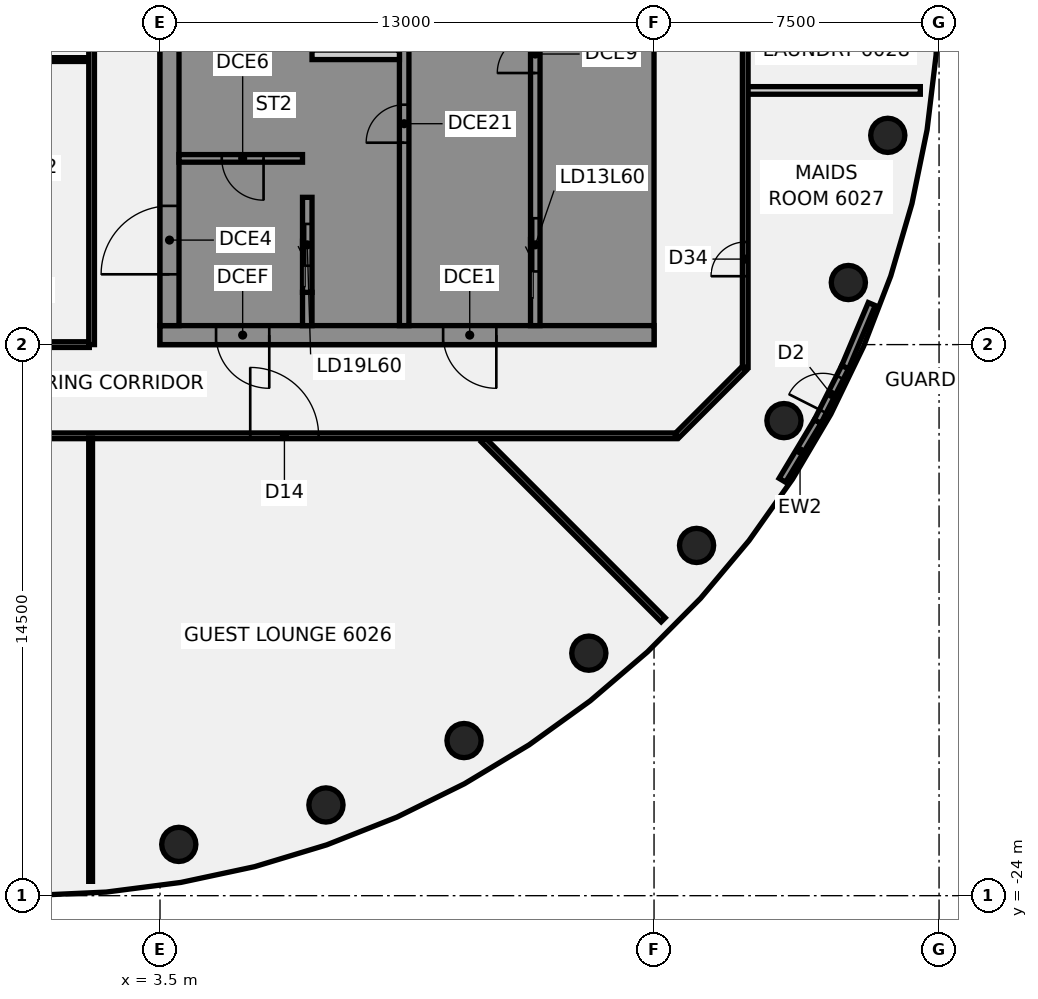
"""IFC4 building model, lengths in metres.
Left out: names, types, materials, properties, quantities, classifications, styles, units other than length and angle.
Written with IfcOpenShell. Run it as: python <this file> out.ifc"""

import sys

from ifc_helpers import new_model, si_unit, direction, frame, frame_2d, origin, origin_2d, place, context, subcontext, project, spatial, polyline, rectangle, circle, outline, extrude, element, fill, save


model = new_model("IFC4")
c1 = context("Model", 3, precision=1e-05, world=origin(), true_north=direction((0.0, 1.0)))
c2 = subcontext(c1, "Body", "Model", "MODEL_VIEW")
j1 = project(units=[si_unit("LENGTHUNIT", "METRE"), si_unit("PLANEANGLEUNIT", "RADIAN")], contexts=[c1])
p1 = place(None, origin())
s1 = spatial("IfcSite", under=j1, at=p1, CompositionType="ELEMENT")
p2 = place(p1, origin())
s2 = spatial("IfcBuilding", under=s1, at=p2, CompositionType="ELEMENT")
p3 = place(p2, frame((0.0, 0.0, 237.9)))
s3 = spatial("IfcBuildingStorey", under=s2, at=p3, CompositionType="ELEMENT", Elevation=237.9)
for number, where, z_axis, x_axis in (
    (1, (3.994, -22.651, -0.14), (0.0, 0.0, 1.0), (1.0, 0.0, 0.0)),
    (2, (7.866, -21.613, -0.14), (0.0, 0.0, 1.0), (1.0, 0.0, 0.0)),
    (3, (11.5, -19.919, -0.14), (0.0, 0.0, 1.0), (1.0, 0.0, 0.0)),
    (4, (14.784, -17.619, -0.14), (0.0, 0.0, 1.0), (1.0, 0.0, 0.0)),
    (5, (17.619, -14.784, -0.14), (0.0, 0.0, 1.0), (1.0, 0.0, 0.0)),
    (6, (19.919, -11.5, -0.14), (0.0, 0.0, 1.0), (1.0, 0.0, 0.0)),
    (7, (21.613, -7.866, -0.14), (0.0, 0.0, 1.0), (1.0, 0.0, 0.0)),
    (8, (22.651, -3.994, -0.14), (0.0, 0.0, 1.0), (1.0, 0.0, 0.0)),
):
    element("IfcColumn", number, at=place(p3, frame(where, z_axis=z_axis, x_axis=x_axis)), inside=s3, PredefinedType="COLUMN", context=c2, shape_type="SweptSolid", body=[
        extrude(circle(Radius=0.45, at=origin_2d()), origin(), (0.0, 0.0, 1.0), 3.6),
    ])
p4 = place(p3, frame((12.01, -12.01, 0.0), z_axis=(0.0, 0.0, 1.0), x_axis=(0.707106781187, -0.707106781187, 0.0)))
e9 = element("IfcWall", 9, at=p4, inside=s3, PredefinedType="PARTITIONING", context=c2, shape_type="SweptSolid", body=[
    extrude(rectangle(XDim=6.691, YDim=0.15, at=frame_2d((3.345, 0.0))), origin(), (0.0, 0.0, 1.0), 2.864),
])
p5 = place(p3, frame((-17.1, -11.9, 0.0), z_axis=(0.0, 0.0, 1.0), x_axis=(1.0, 0.0, 0.0)))
e10 = element("IfcWall", 10, at=p5, inside=s3, PredefinedType="PARTITIONING", context=c2, shape_type="SweptSolid", body=[
    extrude(rectangle(XDim=34.165, YDim=0.15, at=frame_2d((17.083, 0.0))), origin(), (0.0, 0.0, 1.0), 2.864),
])
p6 = place(p5, frame((6.4, 0.0, 0.0)))
e11 = element("IfcOpeningElement", 11, at=p6, cuts=e10, PredefinedType="OPENING", context=c2, shape_type="SweptSolid", body=[
    extrude(rectangle(XDim=1.8, YDim=2.1, at=frame_2d((0.9, 1.05))), frame((0.0, 0.085, 0.0), z_axis=(0.0, -1.0, 0.0), x_axis=(1.0, 0.0, 0.0)), (0.0, 0.0, 1.0), 0.17),
])
p7 = place(p5, frame((12.909, 0.0, 0.0)))
e12 = element("IfcOpeningElement", 12, at=p7, cuts=e10, PredefinedType="OPENING", context=c2, shape_type="SweptSolid", body=[
    extrude(rectangle(XDim=1.8, YDim=2.1, at=frame_2d((0.9, 1.05))), frame((0.0, 0.085, 0.0), z_axis=(0.0, -1.0, 0.0), x_axis=(1.0, 0.0, 0.0)), (0.0, 0.0, 1.0), 0.17),
])
p8 = place(p5, frame((22.974, 0.0, 0.0)))
e13 = element("IfcOpeningElement", 13, at=p8, cuts=e10, PredefinedType="OPENING", context=c2, shape_type="SweptSolid", body=[
    extrude(rectangle(XDim=1.8, YDim=2.1, at=frame_2d((0.9, 1.05))), frame((0.0, 0.085, 0.0), z_axis=(0.0, -1.0, 0.0), x_axis=(1.0, 0.0, 0.0)), (0.0, 0.0, 1.0), 0.17),
])
p9 = place(p5, frame((1.65, 0.0, 0.0)))
e14 = element("IfcOpeningElement", 14, at=p9, cuts=e10, PredefinedType="OPENING", context=c2, shape_type="SweptSolid", body=[
    extrude(rectangle(XDim=0.9, YDim=2.1, at=frame_2d((0.45, 1.05))), frame((0.0, 0.085, 0.0), z_axis=(0.0, -1.0, 0.0), x_axis=(1.0, 0.0, 0.0)), (0.0, 0.0, 1.0), 0.17),
])
p10 = place(p3, frame((-1.64, -9.5, 0.0), z_axis=(0.0, 0.0, 1.0), x_axis=(1.0, 0.0, 0.0)))
e15 = element("IfcWall", 15, at=p10, inside=s3, PredefinedType="PARTITIONING", context=c2, shape_type="SweptSolid", body=[
    extrude(rectangle(XDim=3.28, YDim=0.15, at=frame_2d((1.64, 0.0))), origin(), (0.0, 0.0, 1.0), 2.864),
])
p11 = place(p3, frame((-1.64, -2.0, 0.0), z_axis=(0.0, 0.0, 1.0), x_axis=(1.0, 0.0, 0.0)))
e16 = element("IfcWall", 16, at=p11, inside=s3, PredefinedType="PARTITIONING", context=c2, shape_type="SweptSolid", body=[
    extrude(rectangle(XDim=3.28, YDim=0.1, at=frame_2d((1.64, 0.0))), origin(), (0.0, 0.0, 1.0), 2.864),
])
p12 = place(p3, frame((18.955, -2.812, 0.0), z_axis=(0.0, 0.0, 1.0), x_axis=(1.0, 0.0, 0.0)))
e17 = element("IfcWall", 17, at=p12, inside=s3, PredefinedType="PARTITIONING", context=c2, shape_type="SweptSolid", body=[
    extrude(rectangle(XDim=4.552, YDim=0.2, at=frame_2d((2.276, 0.0))), origin(), (0.0, 0.0, 1.0), 2.864),
])
p13 = place(p3, frame((17.1, -11.9, 0.0), z_axis=(0.0, 0.0, 1.0), x_axis=(0.707106781187, 0.707106781187, 0.0)))
e18 = element("IfcWall", 18, at=p13, inside=s3, PredefinedType="PARTITIONING", context=c2, shape_type="SweptSolid", body=[
    extrude(rectangle(XDim=2.505, YDim=0.15, at=frame_2d((1.253, 0.0))), origin(), (0.0, 0.0, 1.0), 2.864),
])
p14 = place(p3, frame((1.674, -23.623, 0.0), z_axis=(0.0, 0.0, 1.0), x_axis=(0.0, 1.0, 0.0)))
e19 = element("IfcWall", 19, at=p14, inside=s3, PredefinedType="PARTITIONING", context=c2, shape_type="SweptSolid", body=[
    extrude(rectangle(XDim=11.668, YDim=0.1, at=frame_2d((5.834, 0.0))), origin(), (0.0, 0.0, 1.0), 2.864),
])
p15 = place(p3, frame((1.7, -9.5, 0.0), z_axis=(0.0, 0.0, 1.0), x_axis=(0.0, 1.0, 0.0)))
e20 = element("IfcWall", 20, at=p15, inside=s3, PredefinedType="PARTITIONING", context=c2, shape_type="SweptSolid", body=[
    extrude(rectangle(XDim=19.0, YDim=0.15, at=frame_2d((9.5, 0.0))), origin(), (0.0, 0.0, 1.0), 2.864),
])
p16 = place(p3, frame((18.9, -10.1, 0.0), z_axis=(0.0, 0.0, 1.0), x_axis=(0.0, 1.0, 0.0)))
e21 = element("IfcWall", 21, at=p16, inside=s3, PredefinedType="PARTITIONING", context=c2, shape_type="SweptSolid", body=[
    extrude(rectangle(XDim=20.2, YDim=0.15, at=frame_2d((10.1, 0.0))), origin(), (0.0, 0.0, 1.0), 2.864),
])
p17 = place(p16, frame((2.4, 0.0, 0.0)))
e22 = element("IfcOpeningElement", 22, at=p17, cuts=e21, PredefinedType="OPENING", context=c2, shape_type="SweptSolid", body=[
    extrude(rectangle(XDim=0.9, YDim=2.1, at=frame_2d((0.45, 1.05))), frame((0.0, 0.085, 0.0), z_axis=(0.0, -1.0, 0.0), x_axis=(1.0, 0.0, 0.0)), (0.0, 0.0, 1.0), 0.17),
])
p18 = place(p16, frame((11.038, 0.0, 0.0)))
e23 = element("IfcOpeningElement", 23, at=p18, cuts=e21, PredefinedType="OPENING", context=c2, shape_type="SweptSolid", body=[
    extrude(rectangle(XDim=0.9, YDim=2.1, at=frame_2d((0.45, 1.05))), frame((0.0, 0.085, 0.0), z_axis=(0.0, -1.0, 0.0), x_axis=(1.0, 0.0, 0.0)), (0.0, 0.0, 1.0), 0.17),
])
p19 = place(p3, frame((19.877, -13.07, 0.0), z_axis=(0.0, 0.0, 1.0), x_axis=(0.515012774923, 0.85718250196, 0.0)))
e24 = element("IfcWall", 24, at=p19, inside=s3, PredefinedType="SOLIDWALL", context=c2, shape_type="SweptSolid", body=[
    extrude(rectangle(XDim=1.805, YDim=0.2, at=frame_2d((0.903, 0.0))), origin(), (0.0, 0.0, 1.0), 3.46),
])
p20 = place(p3, frame((21.528, -10.095, 0.0), z_axis=(0.0, 0.0, 1.0), x_axis=(0.389260368578, 0.921127768257, 0.0)))
e25 = element("IfcWall", 25, at=p20, inside=s3, PredefinedType="SOLIDWALL", context=c2, shape_type="SweptSolid", body=[
    extrude(rectangle(XDim=1.804, YDim=0.2, at=frame_2d((0.902, 0.0))), origin(), (0.0, 0.0, 1.0), 3.46),
])
p21 = place(p3, frame((20.807, -11.523, 0.0), z_axis=(0.0, 0.0, 1.0), x_axis=(0.450691156641, 0.892679943387, 0.0)))
e26 = element("IfcWall", 26, at=p21, inside=s3, PredefinedType="SOLIDWALL", context=c2, shape_type="SweptSolid", body=[
    extrude(rectangle(XDim=1.599, YDim=0.2, at=frame_2d((0.8, 0.0))), origin(), (0.0, 0.0, 1.0), 3.46),
])
p22 = place(p21, frame((0.3, 0.0, 0.0)))
e27 = element("IfcOpeningElement", 27, at=p22, cuts=e26, PredefinedType="OPENING", context=c2, shape_type="SweptSolid", body=[
    extrude(rectangle(XDim=1.0, YDim=2.4, at=frame_2d((0.5, 1.2))), frame((0.0, 0.11, 0.0), z_axis=(0.0, -1.0, 0.0), x_axis=(1.0, 0.0, 0.0)), (0.0, 0.0, 1.0), 0.22),
])
p23 = place(p3, frame((16.5, -9.25, 0.0), z_axis=(0.0, 0.0, 1.0), x_axis=(-1.0, 0.0, 0.0)))
e28 = element("IfcWall", 28, at=p23, inside=s3, PredefinedType="SHEAR", context=c2, shape_type="SweptSolid", body=[
    extrude(rectangle(XDim=13.0, YDim=0.5, at=frame_2d((6.5, 0.0))), origin(), (0.0, 0.0, 1.0), 3.46),
])
p24 = place(p23, frame((4.15, 0.0, 0.0)))
e29 = element("IfcOpeningElement", 29, at=p24, cuts=e28, PredefinedType="OPENING", context=c2, shape_type="SweptSolid", body=[
    extrude(rectangle(XDim=1.4, YDim=2.1, at=frame_2d((0.7, 1.05))), frame((0.0, 0.26, 0.0), z_axis=(0.0, -1.0, 0.0), x_axis=(1.0, 0.0, 0.0)), (0.0, 0.0, 1.0), 0.52),
])
p25 = place(p23, frame((10.125, 0.0, 0.0)))
e30 = element("IfcOpeningElement", 30, at=p25, cuts=e28, PredefinedType="OPENING", context=c2, shape_type="SweptSolid", body=[
    extrude(rectangle(XDim=1.4, YDim=2.1, at=frame_2d((0.7, 1.05))), frame((0.0, 0.26, 0.0), z_axis=(0.0, -1.0, 0.0), x_axis=(1.0, 0.0, 0.0)), (0.0, 0.0, 1.0), 0.52),
])
p26 = place(p3, origin())
e31 = element("IfcWall", 31, at=p26, inside=s3, PredefinedType="SHEAR", context=c2, shape_type="SweptSolid", body=[
    extrude(outline(polyline([(13.5, -8.125), (13.5, -9.0), (16.0, -9.0), (16.5, -9.0), (16.5, 9.0), (16.0, 9.0), (13.5, 9.0), (13.5, 8.125), (16.0, 8.125), (16.0, 5.625), (13.5, 5.625), (13.5, 5.375), (16.0, 5.375), (16.0, -5.375), (13.5, -5.375), (13.5, -5.625), (16.0, -5.625), (16.0, -8.125), (13.5, -8.125)])), origin(), (0.0, 0.0, 1.0), 3.46),
])
p27 = place(p3, origin())
e32 = element("IfcWall", 32, at=p27, inside=s3, PredefinedType="SHEAR", context=c2, shape_type="SweptSolid", body=[
    extrude(outline(polyline([(9.8, -5.375), (7.5, -5.375), (7.5, 2.625), (9.8, 2.625), (9.8, 2.875), (7.5, 2.875), (7.5, 5.375), (9.8, 5.375), (9.8, 5.625), (7.5, 5.625), (7.5, 8.125), (9.8, 8.125), (9.8, 9.0), (7.5, 9.0), (7.25, 9.0), (7.25, -5.625), (7.5, -5.625), (9.8, -5.625), (9.8, -5.375)])), origin(), (0.0, 0.0, 1.0), 3.46),
])
p28 = place(p3, origin())
e33 = element("IfcWall", 33, at=p28, inside=s3, PredefinedType="SHEAR", context=c2, shape_type="SweptSolid", body=[
    extrude(outline(polyline([(7.5, -8.125), (7.5, -9.0), (9.8, -9.0), (9.8, -8.125), (9.8, -5.625), (9.55, -5.625), (9.55, -8.125), (7.5, -8.125)])), origin(), (0.0, 0.0, 1.0), 3.46),
])
p29 = place(p3, frame((7.375, -9.0, 0.0), z_axis=(0.0, 0.0, 1.0), x_axis=(0.0, 1.0, 0.0)))
e34 = element("IfcWall", 34, at=p29, inside=s3, PredefinedType="SHEAR", context=c2, shape_type="SweptSolid", body=[
    extrude(rectangle(XDim=0.875, YDim=0.25, at=frame_2d((0.438, 0.0))), origin(), (0.0, 0.0, 1.0), 3.46),
])
p30 = place(p3, frame((13.375, -9.0, 0.0), z_axis=(0.0, 0.0, 1.0), x_axis=(0.0, 1.0, 0.0)))
e35 = element("IfcWall", 35, at=p30, inside=s3, PredefinedType="SHEAR", context=c2, shape_type="SweptSolid", body=[
    extrude(rectangle(XDim=18.0, YDim=0.25, at=frame_2d((9.0, 0.0))), origin(), (0.0, 0.0, 1.0), 3.46),
])
p31 = place(p30, frame((1.425, 0.0, 0.0)))
e36 = element("IfcOpeningElement", 36, at=p31, cuts=e35, PredefinedType="OPENING", context=c2, shape_type="SweptSolid", body=[
    extrude(rectangle(XDim=1.4, YDim=2.1, at=frame_2d((0.7, 1.05))), frame((0.0, 0.135, 0.0), z_axis=(0.0, -1.0, 0.0), x_axis=(1.0, 0.0, 0.0)), (0.0, 0.0, 1.0), 0.27),
])
p32 = place(p30, frame((6.646, 0.0, 0.0)))
e37 = element("IfcOpeningElement", 37, at=p32, cuts=e35, PredefinedType="OPENING", context=c2, shape_type="SweptSolid", body=[
    extrude(rectangle(XDim=1.0, YDim=2.1, at=frame_2d((0.5, 1.05))), frame((0.0, 0.135, 0.0), z_axis=(0.0, -1.0, 0.0), x_axis=(1.0, 0.0, 0.0)), (0.0, 0.0, 1.0), 0.27),
])
p33 = place(p30, frame((12.146, 0.0, 0.0)))
e38 = element("IfcOpeningElement", 38, at=p33, cuts=e35, PredefinedType="OPENING", context=c2, shape_type="SweptSolid", body=[
    extrude(rectangle(XDim=1.0, YDim=2.1, at=frame_2d((0.5, 1.05))), frame((0.0, 0.135, 0.0), z_axis=(0.0, -1.0, 0.0), x_axis=(1.0, 0.0, 0.0)), (0.0, 0.0, 1.0), 0.27),
])
p34 = place(p3, frame((9.925, -9.0, 0.0), z_axis=(0.0, 0.0, 1.0), x_axis=(0.0, 1.0, 0.0)))
e39 = element("IfcWall", 39, at=p34, inside=s3, PredefinedType="SHEAR", context=c2, shape_type="SweptSolid", body=[
    extrude(rectangle(XDim=18.0, YDim=0.25, at=frame_2d((9.0, 0.0))), origin(), (0.0, 0.0, 1.0), 3.46),
])
p35 = place(p34, frame((12.575, 0.0, 0.0)))
e40 = element("IfcOpeningElement", 40, at=p35, cuts=e39, PredefinedType="OPENING", context=c2, shape_type="SweptSolid", body=[
    extrude(rectangle(XDim=1.1, YDim=2.1, at=frame_2d((0.55, 1.05))), frame((0.0, 0.135, 0.0), z_axis=(0.0, -1.0, 0.0), x_axis=(1.0, 0.0, 0.0)), (0.0, 0.0, 1.0), 0.27),
])
p36 = place(p34, frame((15.325, 0.0, 0.0)))
e41 = element("IfcOpeningElement", 41, at=p36, cuts=e39, PredefinedType="OPENING", context=c2, shape_type="SweptSolid", body=[
    extrude(rectangle(XDim=1.1, YDim=2.1, at=frame_2d((0.55, 1.05))), frame((0.0, 0.135, 0.0), z_axis=(0.0, -1.0, 0.0), x_axis=(1.0, 0.0, 0.0)), (0.0, 0.0, 1.0), 0.27),
])
p37 = place(p34, frame((4.812, 0.0, 0.0)))
e42 = element("IfcOpeningElement", 42, at=p37, cuts=e39, PredefinedType="OPENING", context=c2, shape_type="SweptSolid", body=[
    extrude(rectangle(XDim=1.0, YDim=2.1, at=frame_2d((0.5, 1.05))), frame((0.0, 0.135, 0.0), z_axis=(0.0, -1.0, 0.0), x_axis=(1.0, 0.0, 0.0)), (0.0, 0.0, 1.0), 0.27),
])
p38 = place(p34, frame((7.562, 0.0, 0.0)))
e43 = element("IfcOpeningElement", 43, at=p38, cuts=e39, PredefinedType="OPENING", context=c2, shape_type="SweptSolid", body=[
    extrude(rectangle(XDim=1.0, YDim=2.1, at=frame_2d((0.5, 1.05))), frame((0.0, 0.135, 0.0), z_axis=(0.0, -1.0, 0.0), x_axis=(1.0, 0.0, 0.0)), (0.0, 0.0, 1.0), 0.27),
])
p39 = place(p34, frame((9.396, 0.0, 0.0)))
e44 = element("IfcOpeningElement", 44, at=p39, cuts=e39, PredefinedType="OPENING", context=c2, shape_type="SweptSolid", body=[
    extrude(rectangle(XDim=1.0, YDim=2.1, at=frame_2d((0.5, 1.05))), frame((0.0, 0.135, 0.0), z_axis=(0.0, -1.0, 0.0), x_axis=(1.0, 0.0, 0.0)), (0.0, 0.0, 1.0), 0.27),
])
p40 = place(p34, frame((10.771, 0.0, 0.0)))
e45 = element("IfcOpeningElement", 45, at=p40, cuts=e39, PredefinedType="OPENING", context=c2, shape_type="SweptSolid", body=[
    extrude(rectangle(XDim=1.0, YDim=2.1, at=frame_2d((0.5, 1.05))), frame((0.0, 0.135, 0.0), z_axis=(0.0, -1.0, 0.0), x_axis=(1.0, 0.0, 0.0)), (0.0, 0.0, 1.0), 0.27),
])
p41 = place(p3, frame((7.375, -8.125, 0.0), z_axis=(0.0, 0.0, 1.0), x_axis=(0.0, 1.0, 0.0)))
e46 = element("IfcWall", 46, at=p41, inside=s3, PredefinedType="SHEAR", context=c2, shape_type="SweptSolid", body=[
    extrude(rectangle(XDim=2.5, YDim=0.25, at=frame_2d((1.25, 0.0))), origin(), (0.0, 0.0, 1.0), 3.46),
])
p42 = place(p41, frame((0.7, 0.0, 0.0)))
e47 = element("IfcOpeningElement", 47, at=p42, cuts=e46, PredefinedType="OPENING", context=c2, shape_type="SweptSolid", body=[
    extrude(rectangle(XDim=1.1, YDim=2.1, at=frame_2d((0.55, 1.05))), frame((0.0, 0.135, 0.0), z_axis=(0.0, -1.0, 0.0), x_axis=(1.0, 0.0, 0.0)), (0.0, 0.0, 1.0), 0.27),
])
p43 = place(p3, frame((3.75, -9.0, 0.0), z_axis=(0.0, 0.0, 1.0), x_axis=(0.0, 1.0, 0.0)))
e48 = element("IfcWall", 48, at=p43, inside=s3, PredefinedType="SHEAR", context=c2, shape_type="SweptSolid", body=[
    extrude(rectangle(XDim=18.0, YDim=0.5, at=frame_2d((9.0, 0.0))), origin(), (0.0, 0.0, 1.0), 3.46),
])
p44 = place(p43, frame((1.35, 0.0, 0.0)))
e49 = element("IfcOpeningElement", 49, at=p44, cuts=e48, PredefinedType="OPENING", context=c2, shape_type="SweptSolid", body=[
    extrude(rectangle(XDim=1.8, YDim=2.1, at=frame_2d((0.9, 1.05))), frame((0.0, 0.26, 0.0), z_axis=(0.0, -1.0, 0.0), x_axis=(1.0, 0.0, 0.0)), (0.0, 0.0, 1.0), 0.52),
])
p45 = place(p43, frame((12.75, 0.0, 0.0)))
e50 = element("IfcOpeningElement", 50, at=p45, cuts=e48, PredefinedType="OPENING", context=c2, shape_type="SweptSolid", body=[
    extrude(rectangle(XDim=1.0, YDim=2.1, at=frame_2d((0.5, 1.05))), frame((0.0, 0.26, 0.0), z_axis=(0.0, -1.0, 0.0), x_axis=(1.0, 0.0, 0.0)), (0.0, 0.0, 1.0), 0.52),
])
p46 = place(p43, frame((16.274, 0.0, 0.0)))
e51 = element("IfcOpeningElement", 51, at=p46, cuts=e48, PredefinedType="OPENING", context=c2, shape_type="SweptSolid", body=[
    extrude(rectangle(XDim=1.0, YDim=2.1, at=frame_2d((0.5, 1.05))), frame((0.0, 0.26, 0.0), z_axis=(0.0, -1.0, 0.0), x_axis=(1.0, 0.0, 0.0)), (0.0, 0.0, 1.0), 0.52),
])
p47 = place(p3, frame((7.25, -4.6, 0.0), z_axis=(0.0, 0.0, 1.0), x_axis=(-1.0, 0.0, 0.0)))
e52 = element("IfcWall", 52, at=p47, inside=s3, PredefinedType="SHEAR", context=c2, shape_type="SweptSolid", body=[
    extrude(rectangle(XDim=3.25, YDim=0.2, at=frame_2d((1.625, 0.0))), origin(), (0.0, 0.0, 1.0), 3.46),
])
p48 = place(p47, frame((1.025, 0.0, 0.0)))
e53 = element("IfcOpeningElement", 53, at=p48, cuts=e52, PredefinedType="OPENING", context=c2, shape_type="SweptSolid", body=[
    extrude(rectangle(XDim=1.1, YDim=2.1, at=frame_2d((0.55, 1.05))), frame((0.0, 0.11, 0.0), z_axis=(0.0, -1.0, 0.0), x_axis=(1.0, 0.0, 0.0)), (0.0, 0.0, 1.0), 0.22),
])
p49 = place(p3, frame((9.8, -1.875, 0.0), z_axis=(0.0, 0.0, 1.0), x_axis=(-1.0, 0.0, 0.0)))
e54 = element("IfcWall", 54, at=p49, inside=s3, PredefinedType="PARTITIONING", context=c2, shape_type="SweptSolid", body=[
    extrude(rectangle(XDim=2.3, YDim=0.25, at=frame_2d((1.15, 0.0))), origin(), (0.0, 0.0, 1.0), 3.46),
])
p50 = place(p8, frame((1.8, 0.0, 0.0), z_axis=(0.0, 0.0, 1.0), x_axis=(-1.0, 0.0, 0.0)))
e55 = element("IfcDoor", 55, at=p50, inside=s3, OperationType="DOUBLE_DOOR_SINGLE_SWING", PredefinedType="DOOR", context=c2, shape_type="SweptSolid", body=[
    extrude(rectangle(XDim=1.8, YDim=2.1, at=frame_2d((0.9, 1.05))), frame((0.0, 0.025, 0.0), z_axis=(0.0, -1.0, 0.0), x_axis=(1.0, 0.0, 0.0)), (0.0, 0.0, 1.0), 0.05),
])
fill(e13, e55)
p51 = place(p17, frame((0.9, 0.0, 0.0), z_axis=(0.0, 0.0, 1.0), x_axis=(-1.0, 0.0, 0.0)))
e56 = element("IfcDoor", 56, at=p51, inside=s3, OperationType="SINGLE_SWING_LEFT", PredefinedType="DOOR", context=c2, shape_type="SweptSolid", body=[
    extrude(rectangle(XDim=0.9, YDim=2.1, at=frame_2d((0.45, 1.05))), frame((0.0, 0.025, 0.0), z_axis=(0.0, -1.0, 0.0), x_axis=(1.0, 0.0, 0.0)), (0.0, 0.0, 1.0), 0.05),
])
fill(e22, e56)
p52 = place(p22, origin())
e57 = element("IfcDoor", 57, at=p52, inside=s3, OperationType="SINGLE_SWING_LEFT", PredefinedType="DOOR", context=c2, shape_type="SweptSolid", body=[
    extrude(rectangle(XDim=1.0, YDim=2.4, at=frame_2d((0.5, 1.2))), frame((0.0, 0.025, 0.0), z_axis=(0.0, -1.0, 0.0), x_axis=(1.0, 0.0, 0.0)), (0.0, 0.0, 1.0), 0.05),
])
fill(e27, e57)
p53 = place(p24, origin())
e58 = element("IfcDoor", 58, at=p53, inside=s3, OperationType="SINGLE_SWING_LEFT", PredefinedType="DOOR", context=c2, shape_type="SweptSolid", body=[
    extrude(rectangle(XDim=1.4, YDim=2.1, at=frame_2d((0.7, 1.05))), frame((0.0, 0.025, 0.0), z_axis=(0.0, -1.0, 0.0), x_axis=(1.0, 0.0, 0.0)), (0.0, 0.0, 1.0), 0.05),
])
fill(e29, e58)
p54 = place(p25, origin())
e59 = element("IfcDoor", 59, at=p54, inside=s3, OperationType="SINGLE_SWING_LEFT", PredefinedType="DOOR", context=c2, shape_type="SweptSolid", body=[
    extrude(rectangle(XDim=1.4, YDim=2.1, at=frame_2d((0.7, 1.05))), frame((0.0, 0.025, 0.0), z_axis=(0.0, -1.0, 0.0), x_axis=(1.0, 0.0, 0.0)), (0.0, 0.0, 1.0), 0.05),
])
fill(e30, e59)
p55 = place(p44, origin())
e60 = element("IfcDoor", 60, at=p55, inside=s3, OperationType="SINGLE_SWING_LEFT", PredefinedType="DOOR", context=c2, shape_type="SweptSolid", body=[
    extrude(rectangle(XDim=1.8, YDim=2.1, at=frame_2d((0.9, 1.05))), frame((0.0, 0.025, 0.0), z_axis=(0.0, -1.0, 0.0), x_axis=(1.0, 0.0, 0.0)), (0.0, 0.0, 1.0), 0.05),
])
fill(e49, e60)
p56 = place(p48, origin())
e61 = element("IfcDoor", 61, at=p56, inside=s3, OperationType="SINGLE_SWING_LEFT", PredefinedType="DOOR", context=c2, shape_type="SweptSolid", body=[
    extrude(rectangle(XDim=1.1, YDim=2.1, at=frame_2d((0.55, 1.05))), frame((0.0, 0.025, 0.0), z_axis=(0.0, -1.0, 0.0), x_axis=(1.0, 0.0, 0.0)), (0.0, 0.0, 1.0), 0.05),
])
fill(e53, e61)
p57 = place(p31, origin())
e62 = element("IfcDoor", 62, at=p57, inside=s3, OperationType="SLIDING_TO_LEFT", PredefinedType="DOOR", context=c2, shape_type="SweptSolid", body=[
    extrude(rectangle(XDim=1.4, YDim=2.1, at=frame_2d((0.7, 1.05))), frame((0.0, 0.025, 0.0), z_axis=(0.0, -1.0, 0.0), x_axis=(1.0, 0.0, 0.0)), (0.0, 0.0, 1.0), 0.05),
])
fill(e36, e62)
p58 = place(p42, origin())
e63 = element("IfcDoor", 63, at=p58, inside=s3, OperationType="SLIDING_TO_LEFT", PredefinedType="DOOR", context=c2, shape_type="SweptSolid", body=[
    extrude(rectangle(XDim=1.1, YDim=2.1, at=frame_2d((0.55, 1.05))), frame((0.0, 0.025, 0.0), z_axis=(0.0, -1.0, 0.0), x_axis=(1.0, 0.0, 0.0)), (0.0, 0.0, 1.0), 0.05),
])
fill(e47, e63)
p59 = place(p32, origin())
e64 = element("IfcDoor", 64, at=p59, inside=s3, OperationType="SINGLE_SWING_LEFT", PredefinedType="DOOR", context=c2, shape_type="SweptSolid", body=[
    extrude(rectangle(XDim=1.0, YDim=2.1, at=frame_2d((0.5, 1.05))), frame((0.0, 0.025, 0.0), z_axis=(0.0, -1.0, 0.0), x_axis=(1.0, 0.0, 0.0)), (0.0, 0.0, 1.0), 0.05),
])
fill(e37, e64)
p60 = place(p37, origin())
e65 = element("IfcDoor", 65, at=p60, inside=s3, OperationType="SINGLE_SWING_LEFT", PredefinedType="DOOR", context=c2, shape_type="SweptSolid", body=[
    extrude(rectangle(XDim=1.0, YDim=2.1, at=frame_2d((0.5, 1.05))), frame((0.0, 0.025, 0.0), z_axis=(0.0, -1.0, 0.0), x_axis=(1.0, 0.0, 0.0)), (0.0, 0.0, 1.0), 0.05),
])
fill(e42, e65)
save(model, sys.argv[1])
